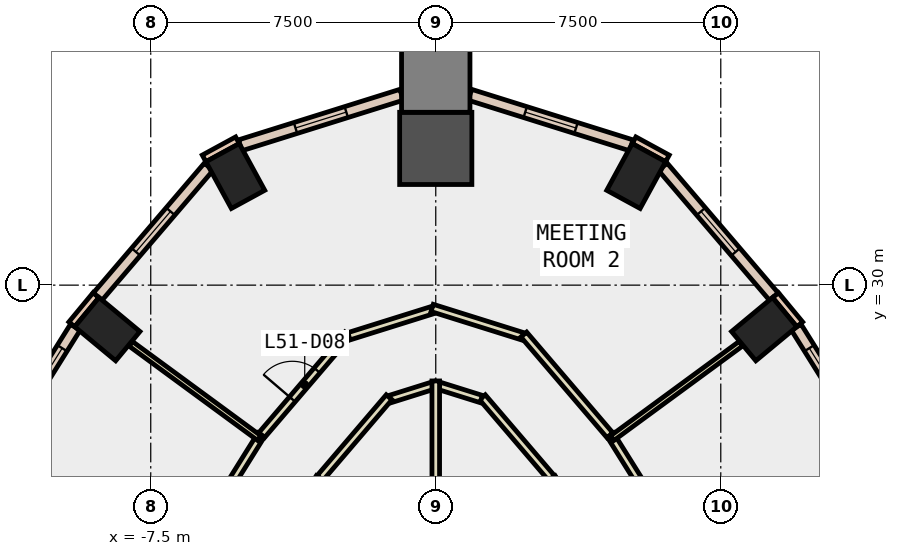
"""IFC4 building model, lengths in metres.
Left out: names, types, materials, properties, quantities, classifications, styles, units other than length and angle.
Written with IfcOpenShell. Run it as: python <this file> out.ifc"""

import sys

from ifc_helpers import new_model, si_unit, direction, frame, frame_2d, origin, origin_2d, place, context, subcontext, project, spatial, rectangle, extrude, element, fill, save


model = new_model("IFC4")
c1 = context("Model", 3, precision=1e-05, world=origin(), true_north=direction((0.0, 1.0)))
c2 = subcontext(c1, "Body", "Model", "MODEL_VIEW")
j1 = project(units=[si_unit("LENGTHUNIT", "METRE"), si_unit("PLANEANGLEUNIT", "RADIAN")], contexts=[c1])
p1 = place(None, origin())
s1 = spatial("IfcSite", under=j1, at=p1, CompositionType="ELEMENT")
p2 = place(p1, origin())
s2 = spatial("IfcBuilding", under=s1, at=p2, CompositionType="ELEMENT")
p3 = place(p2, frame((0.0, 0.0, 227.6)))
s3 = spatial("IfcBuildingStorey", under=s2, at=p3, CompositionType="ELEMENT", Elevation=227.6)
for number, where, z_axis, x_axis in (
    (1, (8.642, 28.842, -0.4), (0.0, 0.0, 1.0), (-0.639, 0.769, 0.0)),
    (2, (5.274, 32.871, -0.4), (0.0, 0.0, 1.0), (-0.878, 0.478, 0.0)),
):
    element("IfcColumn", number, at=place(p3, frame(where, z_axis=z_axis, x_axis=x_axis)), inside=s3, PredefinedType="COLUMN", context=c2, shape_type="SweptSolid", body=[
        extrude(rectangle(XDim=1.0, YDim=1.4, at=origin_2d()), origin(), (0.0, 0.0, 1.0), 4.2),
    ])
p4 = place(p3, frame((0.0, 33.598, -0.4), z_axis=(0.0, 0.0, 1.0), x_axis=(0.0, 1.0, 0.0)))
e3 = element("IfcColumn", 3, at=p4, inside=s3, PredefinedType="COLUMN", context=c2, shape_type="SweptSolid", body=[
    extrude(rectangle(XDim=1.9, YDim=1.9, at=origin_2d()), origin(), (0.0, 0.0, 1.0), 4.2),
])
for number, where, z_axis, x_axis in (
    (4, (-5.274, 32.871, -0.4), (0.0, 0.0, 1.0), (0.878, 0.478, 0.0)),
    (5, (-8.642, 28.842, -0.4), (0.0, 0.0, 1.0), (0.639, 0.769, 0.0)),
):
    element("IfcColumn", number, at=place(p3, frame(where, z_axis=z_axis, x_axis=x_axis)), inside=s3, PredefinedType="COLUMN", context=c2, shape_type="SweptSolid", body=[
        extrude(rectangle(XDim=1.0, YDim=1.4, at=origin_2d()), origin(), (0.0, 0.0, 1.0), 4.2),
    ])
p5 = place(p3, frame((0.0, 35.448, -0.4), z_axis=(0.0, 0.0, 1.0), x_axis=(0.0, 1.0, 0.0)))
e6 = element("IfcColumn", 6, at=p5, inside=s3, PredefinedType="COLUMN", context=c2, shape_type="SweptSolid", body=[
    extrude(rectangle(XDim=1.8, YDim=1.8, at=origin_2d()), origin(), (0.0, 0.0, 1.0), 4.2),
])
for number, where, z_axis, x_axis in (
    (7, (6.096, 33.334, 0.0), (0.0, 0.0, 1.0), (-0.878, 0.478, 0.0)),
    (8, (-5.218, 33.812, 0.0), (0.0, 0.0, 1.0), (-0.878, -0.478, 0.0)),
):
    element("IfcWall", number, at=place(p3, frame(where, z_axis=z_axis, x_axis=x_axis)), inside=s3, PredefinedType="STANDARD", context=c2, shape_type="SweptSolid", body=[
        extrude(rectangle(XDim=1.0, YDim=0.2, at=frame_2d((0.5, 0.0))), origin(), (0.0, 0.0, 1.0), 3.8),
    ])
for number, where, z_axis, x_axis in (
    (9, (9.577, 28.968, 0.0), (0.0, 0.0, 1.0), (-0.638, 0.77, 0.0)),
    (10, (-8.939, 29.738, 0.0), (0.0, 0.0, 1.0), (-0.638, -0.77, 0.0)),
):
    element("IfcWall", number, at=place(p3, frame(where, z_axis=z_axis, x_axis=x_axis)), inside=s3, PredefinedType="STANDARD", context=c2, shape_type="SweptSolid", body=[
        extrude(rectangle(XDim=1.0, YDim=0.2, at=frame_2d((0.5, 0.0))), origin(), (0.0, 0.0, 1.0), 3.8),
    ])
p6 = place(p3, frame((13.41, 22.614, 0.0), z_axis=(0.0, 0.0, 1.0), x_axis=(-0.530037467052, 0.847974223383, 0.0)))
e11 = element("IfcWall", 11, at=p6, inside=s3, PredefinedType="STANDARD", context=c2, shape_type="SweptSolid", body=[
    extrude(rectangle(XDim=7.405, YDim=0.3, at=frame_2d((3.702, 0.0))), origin(), (0.0, 0.0, 1.0), 3.8),
])
p7 = place(p6, frame((0.651, 0.0, 0.9)))
e12 = element("IfcOpeningElement", 12, at=p7, cuts=e11, PredefinedType="OPENING", context=c2, shape_type="SweptSolid", body=[
    extrude(rectangle(XDim=2.4, YDim=2.6, at=frame_2d((1.2, 1.3))), frame((0.0, 0.16, 0.0), z_axis=(0.0, -1.0, 0.0), x_axis=(1.0, 0.0, 0.0)), (0.0, 0.0, 1.0), 0.32),
])
p8 = place(p6, frame((4.354, 0.0, 0.9)))
e13 = element("IfcOpeningElement", 13, at=p8, cuts=e11, PredefinedType="OPENING", context=c2, shape_type="SweptSolid", body=[
    extrude(rectangle(XDim=2.4, YDim=2.6, at=frame_2d((1.2, 1.3))), frame((0.0, 0.16, 0.0), z_axis=(0.0, -1.0, 0.0), x_axis=(1.0, 0.0, 0.0)), (0.0, 0.0, 1.0), 0.32),
])
p9 = place(p3, frame((8.895, 29.7, 0.0), z_axis=(0.0, 0.0, 1.0), x_axis=(-0.649967502437, 0.75996200285, 0.0)))
e14 = element("IfcWall", 14, at=p9, inside=s3, PredefinedType="STANDARD", context=c2, shape_type="SweptSolid", body=[
    extrude(rectangle(XDim=4.492, YDim=0.3, at=frame_2d((2.246, 0.0))), origin(), (0.0, 0.0, 1.0), 3.8),
])
p10 = place(p9, frame((1.546, 0.0, 0.9)))
e15 = element("IfcOpeningElement", 15, at=p10, cuts=e14, PredefinedType="OPENING", context=c2, shape_type="SweptSolid", body=[
    extrude(rectangle(XDim=1.4, YDim=2.6, at=frame_2d((0.7, 1.3))), frame((0.0, 0.16, 0.0), z_axis=(0.0, -1.0, 0.0), x_axis=(1.0, 0.0, 0.0)), (0.0, 0.0, 1.0), 0.32),
])
p11 = place(p3, frame((5.146, 33.679, 0.0), z_axis=(0.0, 0.0, 1.0), x_axis=(-0.95429628924, 0.298862162783, 0.0)))
e16 = element("IfcWall", 16, at=p11, inside=s3, PredefinedType="STANDARD", context=c2, shape_type="SweptSolid", body=[
    extrude(rectangle(XDim=4.45, YDim=0.3, at=frame_2d((2.225, 0.0))), origin(), (0.0, 0.0, 1.0), 3.8),
])
p12 = place(p11, frame((1.525, 0.0, 0.9)))
e17 = element("IfcOpeningElement", 17, at=p12, cuts=e16, PredefinedType="OPENING", context=c2, shape_type="SweptSolid", body=[
    extrude(rectangle(XDim=1.4, YDim=2.6, at=frame_2d((0.7, 1.3))), frame((0.0, 0.16, 0.0), z_axis=(0.0, -1.0, 0.0), x_axis=(1.0, 0.0, 0.0)), (0.0, 0.0, 1.0), 0.32),
])
p13 = place(p3, frame((-0.899, 35.009, 0.0), z_axis=(0.0, 0.0, 1.0), x_axis=(-0.95429628924, -0.298862162783, 0.0)))
e18 = element("IfcWall", 18, at=p13, inside=s3, PredefinedType="STANDARD", context=c2, shape_type="SweptSolid", body=[
    extrude(rectangle(XDim=4.45, YDim=0.3, at=frame_2d((2.225, 0.0))), origin(), (0.0, 0.0, 1.0), 3.8),
])
p14 = place(p13, frame((1.525, 0.0, 0.9)))
e19 = element("IfcOpeningElement", 19, at=p14, cuts=e18, PredefinedType="OPENING", context=c2, shape_type="SweptSolid", body=[
    extrude(rectangle(XDim=1.4, YDim=2.6, at=frame_2d((0.7, 1.3))), frame((0.0, 0.16, 0.0), z_axis=(0.0, -1.0, 0.0), x_axis=(1.0, 0.0, 0.0)), (0.0, 0.0, 1.0), 0.32),
])
p15 = place(p3, frame((-5.975, 33.114, 0.0), z_axis=(0.0, 0.0, 1.0), x_axis=(-0.649967502437, -0.75996200285, 0.0)))
e20 = element("IfcWall", 20, at=p15, inside=s3, PredefinedType="STANDARD", context=c2, shape_type="SweptSolid", body=[
    extrude(rectangle(XDim=4.492, YDim=0.3, at=frame_2d((2.246, 0.0))), origin(), (0.0, 0.0, 1.0), 3.8),
])
p16 = place(p15, frame((1.546, 0.0, 0.9)))
e21 = element("IfcOpeningElement", 21, at=p16, cuts=e20, PredefinedType="OPENING", context=c2, shape_type="SweptSolid", body=[
    extrude(rectangle(XDim=1.4, YDim=2.6, at=frame_2d((0.7, 1.3))), frame((0.0, 0.16, 0.0), z_axis=(0.0, -1.0, 0.0), x_axis=(1.0, 0.0, 0.0)), (0.0, 0.0, 1.0), 0.32),
])
p17 = place(p3, frame((-9.485, 28.893, 0.0), z_axis=(0.0, 0.0, 1.0), x_axis=(-0.530037467052, -0.847974223383, 0.0)))
e22 = element("IfcWall", 22, at=p17, inside=s3, PredefinedType="STANDARD", context=c2, shape_type="SweptSolid", body=[
    extrude(rectangle(XDim=7.405, YDim=0.3, at=frame_2d((3.702, 0.0))), origin(), (0.0, 0.0, 1.0), 3.8),
])
p18 = place(p17, frame((0.651, 0.0, 0.9)))
e23 = element("IfcOpeningElement", 23, at=p18, cuts=e22, PredefinedType="OPENING", context=c2, shape_type="SweptSolid", body=[
    extrude(rectangle(XDim=2.4, YDim=2.6, at=frame_2d((1.2, 1.3))), frame((0.0, 0.16, 0.0), z_axis=(0.0, -1.0, 0.0), x_axis=(1.0, 0.0, 0.0)), (0.0, 0.0, 1.0), 0.32),
])
p19 = place(p17, frame((4.354, 0.0, 0.9)))
e24 = element("IfcOpeningElement", 24, at=p19, cuts=e22, PredefinedType="OPENING", context=c2, shape_type="SweptSolid", body=[
    extrude(rectangle(XDim=2.4, YDim=2.6, at=frame_2d((1.2, 1.3))), frame((0.0, 0.16, 0.0), z_axis=(0.0, -1.0, 0.0), x_axis=(1.0, 0.0, 0.0)), (0.0, 0.0, 1.0), 0.32),
])
p20 = place(p3, frame((5.087, 21.685, 0.0), z_axis=(0.0, 0.0, 1.0), x_axis=(-0.529998940003, 0.847998304005, 0.0)))
e25 = element("IfcWall", 25, at=p20, inside=s3, PredefinedType="PARTITIONING", context=c2, shape_type="SweptSolid", body=[
    extrude(rectangle(XDim=3.83, YDim=0.2, at=frame_2d((1.915, 0.0))), origin(), (0.0, 0.0, 1.0), 3.8),
])
p21 = place(p20, frame((1.416, 0.0, 0.0)))
e26 = element("IfcOpeningElement", 26, at=p21, cuts=e25, PredefinedType="OPENING", context=c2, shape_type="SweptSolid", body=[
    extrude(rectangle(XDim=1.0, YDim=2.1, at=frame_2d((0.5, 1.05))), frame((0.0, 0.11, 0.0), z_axis=(0.0, -1.0, 0.0), x_axis=(1.0, 0.0, 0.0)), (0.0, 0.0, 1.0), 0.22),
])
p22 = place(p3, frame((3.045, 24.925, 0.0), z_axis=(0.0, 0.0, 1.0), x_axis=(-0.650057725157, 0.759884829407, 0.0)))
e27 = element("IfcWall", 27, at=p22, inside=s3, PredefinedType="PARTITIONING", context=c2, shape_type="SweptSolid", body=[
    extrude(rectangle(XDim=2.796, YDim=0.2, at=frame_2d((1.398, 0.0))), origin(), (0.0, 0.0, 1.0), 3.8),
])
p23 = place(p3, frame((1.196, 27.004, 0.0), z_axis=(0.0, 0.0, 1.0), x_axis=(-0.954200976086, 0.29916633707, 0.0)))
e28 = element("IfcWall", 28, at=p23, inside=s3, PredefinedType="PARTITIONING", context=c2, shape_type="SweptSolid", body=[
    extrude(rectangle(XDim=1.154, YDim=0.2, at=frame_2d((0.577, 0.0))), origin(), (0.0, 0.0, 1.0), 3.8),
])
p24 = place(p3, frame((0.0, 27.379, 0.0), z_axis=(0.0, 0.0, 1.0), x_axis=(-0.954198830916, -0.299173179075, 0.0)))
e29 = element("IfcWall", 29, at=p24, inside=s3, PredefinedType="PARTITIONING", context=c2, shape_type="SweptSolid", body=[
    extrude(rectangle(XDim=1.253, YDim=0.2, at=frame_2d((0.627, 0.0))), origin(), (0.0, 0.0, 1.0), 3.8),
])
p25 = place(p3, frame((-1.227, 27.05, 0.0), z_axis=(0.0, 0.0, 1.0), x_axis=(-0.650057725157, -0.759884829407, 0.0)))
e30 = element("IfcWall", 30, at=p25, inside=s3, PredefinedType="PARTITIONING", context=c2, shape_type="SweptSolid", body=[
    extrude(rectangle(XDim=2.796, YDim=0.2, at=frame_2d((1.398, 0.0))), origin(), (0.0, 0.0, 1.0), 3.8),
])
p26 = place(p3, frame((-3.057, 24.933, 0.0), z_axis=(0.0, 0.0, 1.0), x_axis=(-0.529998940003, -0.847998304005, 0.0)))
e31 = element("IfcWall", 31, at=p26, inside=s3, PredefinedType="PARTITIONING", context=c2, shape_type="SweptSolid", body=[
    extrude(rectangle(XDim=3.83, YDim=0.2, at=frame_2d((1.915, 0.0))), origin(), (0.0, 0.0, 1.0), 3.8),
])
p27 = place(p26, frame((1.416, 0.0, 0.0)))
e32 = element("IfcOpeningElement", 32, at=p27, cuts=e31, PredefinedType="OPENING", context=c2, shape_type="SweptSolid", body=[
    extrude(rectangle(XDim=1.0, YDim=2.1, at=frame_2d((0.5, 1.05))), frame((0.0, 0.11, 0.0), z_axis=(0.0, -1.0, 0.0), x_axis=(1.0, 0.0, 0.0)), (0.0, 0.0, 1.0), 0.22),
])
p28 = place(p3, frame((4.593, 26.061, 0.0), z_axis=(0.0, 0.0, 1.0), x_axis=(0.530012579093, -0.847989779421, 0.0)))
e33 = element("IfcWall", 33, at=p28, inside=s3, PredefinedType="PARTITIONING", context=c2, shape_type="SweptSolid", body=[
    extrude(rectangle(XDim=8.045, YDim=0.2, at=frame_2d((4.022, 0.0))), origin(), (0.0, 0.0, 1.0), 3.8),
])
p29 = place(p28, frame((3.522, 0.0, 0.0)))
e34 = element("IfcOpeningElement", 34, at=p29, cuts=e33, PredefinedType="OPENING", context=c2, shape_type="SweptSolid", body=[
    extrude(rectangle(XDim=1.0, YDim=2.1, at=frame_2d((0.5, 1.05))), frame((0.0, 0.11, 0.0), z_axis=(0.0, -1.0, 0.0), x_axis=(1.0, 0.0, 0.0)), (0.0, 0.0, 1.0), 0.22),
])
p30 = place(p3, frame((-4.581, 26.052, 0.0), z_axis=(0.0, 0.0, 1.0), x_axis=(0.650040973726, 0.759899159413, 0.0)))
e35 = element("IfcWall", 35, at=p30, inside=s3, PredefinedType="PARTITIONING", context=c2, shape_type="SweptSolid", body=[
    extrude(rectangle(XDim=3.485, YDim=0.2, at=frame_2d((1.742, 0.0))), origin(), (0.0, 0.0, 1.0), 3.8),
])
p31 = place(p30, frame((1.243, 0.0, 0.0)))
e36 = element("IfcOpeningElement", 36, at=p31, cuts=e35, PredefinedType="OPENING", context=c2, shape_type="SweptSolid", body=[
    extrude(rectangle(XDim=1.0, YDim=2.1, at=frame_2d((0.5, 1.05))), frame((0.0, 0.11, 0.0), z_axis=(0.0, -1.0, 0.0), x_axis=(1.0, 0.0, 0.0)), (0.0, 0.0, 1.0), 0.22),
])
p32 = place(p3, frame((-2.285, 28.654, 0.0), z_axis=(0.0, 0.0, 1.0), x_axis=(0.954271519007, 0.298941245085, 0.0)))
e37 = element("IfcWall", 37, at=p32, inside=s3, PredefinedType="PARTITIONING", context=c2, shape_type="SweptSolid", body=[
    extrude(rectangle(XDim=2.295, YDim=0.2, at=frame_2d((1.147, 0.0))), origin(), (0.0, 0.0, 1.0), 3.8),
])
p33 = place(p3, frame((-0.095, 29.4, 0.0), z_axis=(0.0, 0.0, 1.0), x_axis=(0.954235803916, -0.29905522989, 0.0)))
e38 = element("IfcWall", 38, at=p33, inside=s3, PredefinedType="PARTITIONING", context=c2, shape_type="SweptSolid", body=[
    extrude(rectangle(XDim=2.494, YDim=0.2, at=frame_2d((1.247, 0.0))), origin(), (0.0, 0.0, 1.0), 3.8),
])
p34 = place(p3, frame((2.316, 28.7, 0.0), z_axis=(0.0, 0.0, 1.0), x_axis=(0.650040973726, -0.759899159413, 0.0)))
e39 = element("IfcWall", 39, at=p34, inside=s3, PredefinedType="PARTITIONING", context=c2, shape_type="SweptSolid", body=[
    extrude(rectangle(XDim=3.485, YDim=0.2, at=frame_2d((1.742, 0.0))), origin(), (0.0, 0.0, 1.0), 3.8),
])
p35 = place(p3, frame((-8.896, 19.176, 0.0), z_axis=(0.0, 0.0, 1.0), x_axis=(0.529985425286, 0.848006750553, 0.0)))
e40 = element("IfcWall", 40, at=p35, inside=s3, PredefinedType="PARTITIONING", context=c2, shape_type="SweptSolid", body=[
    extrude(rectangle(XDim=8.119, YDim=0.2, at=frame_2d((4.06, 0.0))), origin(), (0.0, 0.0, 1.0), 3.8),
])
p36 = place(p35, frame((3.56, 0.0, 0.0)))
e41 = element("IfcOpeningElement", 41, at=p36, cuts=e40, PredefinedType="OPENING", context=c2, shape_type="SweptSolid", body=[
    extrude(rectangle(XDim=1.0, YDim=2.1, at=frame_2d((0.5, 1.05))), frame((0.0, 0.11, 0.0), z_axis=(0.0, -1.0, 0.0), x_axis=(1.0, 0.0, 0.0)), (0.0, 0.0, 1.0), 0.22),
])
p37 = place(p3, frame((0.0, 23.0, 0.0), z_axis=(0.0, 0.0, 1.0), x_axis=(0.0, 1.0, 0.0)))
e42 = element("IfcWall", 42, at=p37, inside=s3, PredefinedType="PARTITIONING", context=c2, shape_type="SweptSolid", body=[
    extrude(rectangle(XDim=4.479, YDim=0.2, at=frame_2d((2.24, 0.0))), origin(), (0.0, 0.0, 1.0), 3.8),
])
for number, where, z_axis, x_axis in (
    (43, (4.646, 25.976, 0.0), (0.0, 0.0, 1.0), (0.806, 0.592, 0.0)),
    (44, (-4.646, 25.976, 0.0), (0.0, 0.0, 1.0), (-0.806, 0.592, 0.0)),
):
    element("IfcWall", number, at=place(p3, frame(where, z_axis=z_axis, x_axis=x_axis)), inside=s3, PredefinedType="PARTITIONING", context=c2, shape_type="SweptSolid", body=[
        extrude(rectangle(XDim=4.193, YDim=0.15, at=frame_2d((2.096, 0.0))), origin(), (0.0, 0.0, 1.0), 3.8),
    ])
p38 = place(p8, origin())
e45 = element("IfcWindow", 45, at=p38, inside=s3, PartitioningType="SINGLE_PANEL", PredefinedType="WINDOW", context=c2, shape_type="SweptSolid", body=[
    extrude(rectangle(XDim=2.4, YDim=2.6, at=frame_2d((1.2, 1.3))), frame((0.0, 0.03, 0.0), z_axis=(0.0, -1.0, 0.0), x_axis=(1.0, 0.0, 0.0)), (0.0, 0.0, 1.0), 0.06),
])
fill(e13, e45)
p39 = place(p10, origin())
e46 = element("IfcWindow", 46, at=p39, inside=s3, PartitioningType="SINGLE_PANEL", PredefinedType="WINDOW", context=c2, shape_type="SweptSolid", body=[
    extrude(rectangle(XDim=1.4, YDim=2.6, at=frame_2d((0.7, 1.3))), frame((0.0, 0.03, 0.0), z_axis=(0.0, -1.0, 0.0), x_axis=(1.0, 0.0, 0.0)), (0.0, 0.0, 1.0), 0.06),
])
fill(e15, e46)
p40 = place(p12, origin())
e47 = element("IfcWindow", 47, at=p40, inside=s3, PartitioningType="SINGLE_PANEL", PredefinedType="WINDOW", context=c2, shape_type="SweptSolid", body=[
    extrude(rectangle(XDim=1.4, YDim=2.6, at=frame_2d((0.7, 1.3))), frame((0.0, 0.03, 0.0), z_axis=(0.0, -1.0, 0.0), x_axis=(1.0, 0.0, 0.0)), (0.0, 0.0, 1.0), 0.06),
])
fill(e17, e47)
p41 = place(p14, origin())
e48 = element("IfcWindow", 48, at=p41, inside=s3, PartitioningType="SINGLE_PANEL", PredefinedType="WINDOW", context=c2, shape_type="SweptSolid", body=[
    extrude(rectangle(XDim=1.4, YDim=2.6, at=frame_2d((0.7, 1.3))), frame((0.0, 0.03, 0.0), z_axis=(0.0, -1.0, 0.0), x_axis=(1.0, 0.0, 0.0)), (0.0, 0.0, 1.0), 0.06),
])
fill(e19, e48)
p42 = place(p16, origin())
e49 = element("IfcWindow", 49, at=p42, inside=s3, PartitioningType="SINGLE_PANEL", PredefinedType="WINDOW", context=c2, shape_type="SweptSolid", body=[
    extrude(rectangle(XDim=1.4, YDim=2.6, at=frame_2d((0.7, 1.3))), frame((0.0, 0.03, 0.0), z_axis=(0.0, -1.0, 0.0), x_axis=(1.0, 0.0, 0.0)), (0.0, 0.0, 1.0), 0.06),
])
fill(e21, e49)
p43 = place(p18, origin())
e50 = element("IfcWindow", 50, at=p43, inside=s3, PartitioningType="SINGLE_PANEL", PredefinedType="WINDOW", context=c2, shape_type="SweptSolid", body=[
    extrude(rectangle(XDim=2.4, YDim=2.6, at=frame_2d((1.2, 1.3))), frame((0.0, 0.03, 0.0), z_axis=(0.0, -1.0, 0.0), x_axis=(1.0, 0.0, 0.0)), (0.0, 0.0, 1.0), 0.06),
])
fill(e23, e50)
p44 = place(p31, origin())
e51 = element("IfcDoor", 51, at=p44, inside=s3, OperationType="SINGLE_SWING_LEFT", PredefinedType="DOOR", context=c2, shape_type="SweptSolid", body=[
    extrude(rectangle(XDim=1.0, YDim=2.1, at=frame_2d((0.5, 1.05))), frame((0.0, 0.025, 0.0), z_axis=(0.0, -1.0, 0.0), x_axis=(1.0, 0.0, 0.0)), (0.0, 0.0, 1.0), 0.05),
])
fill(e36, e51)
save(model, sys.argv[1])
